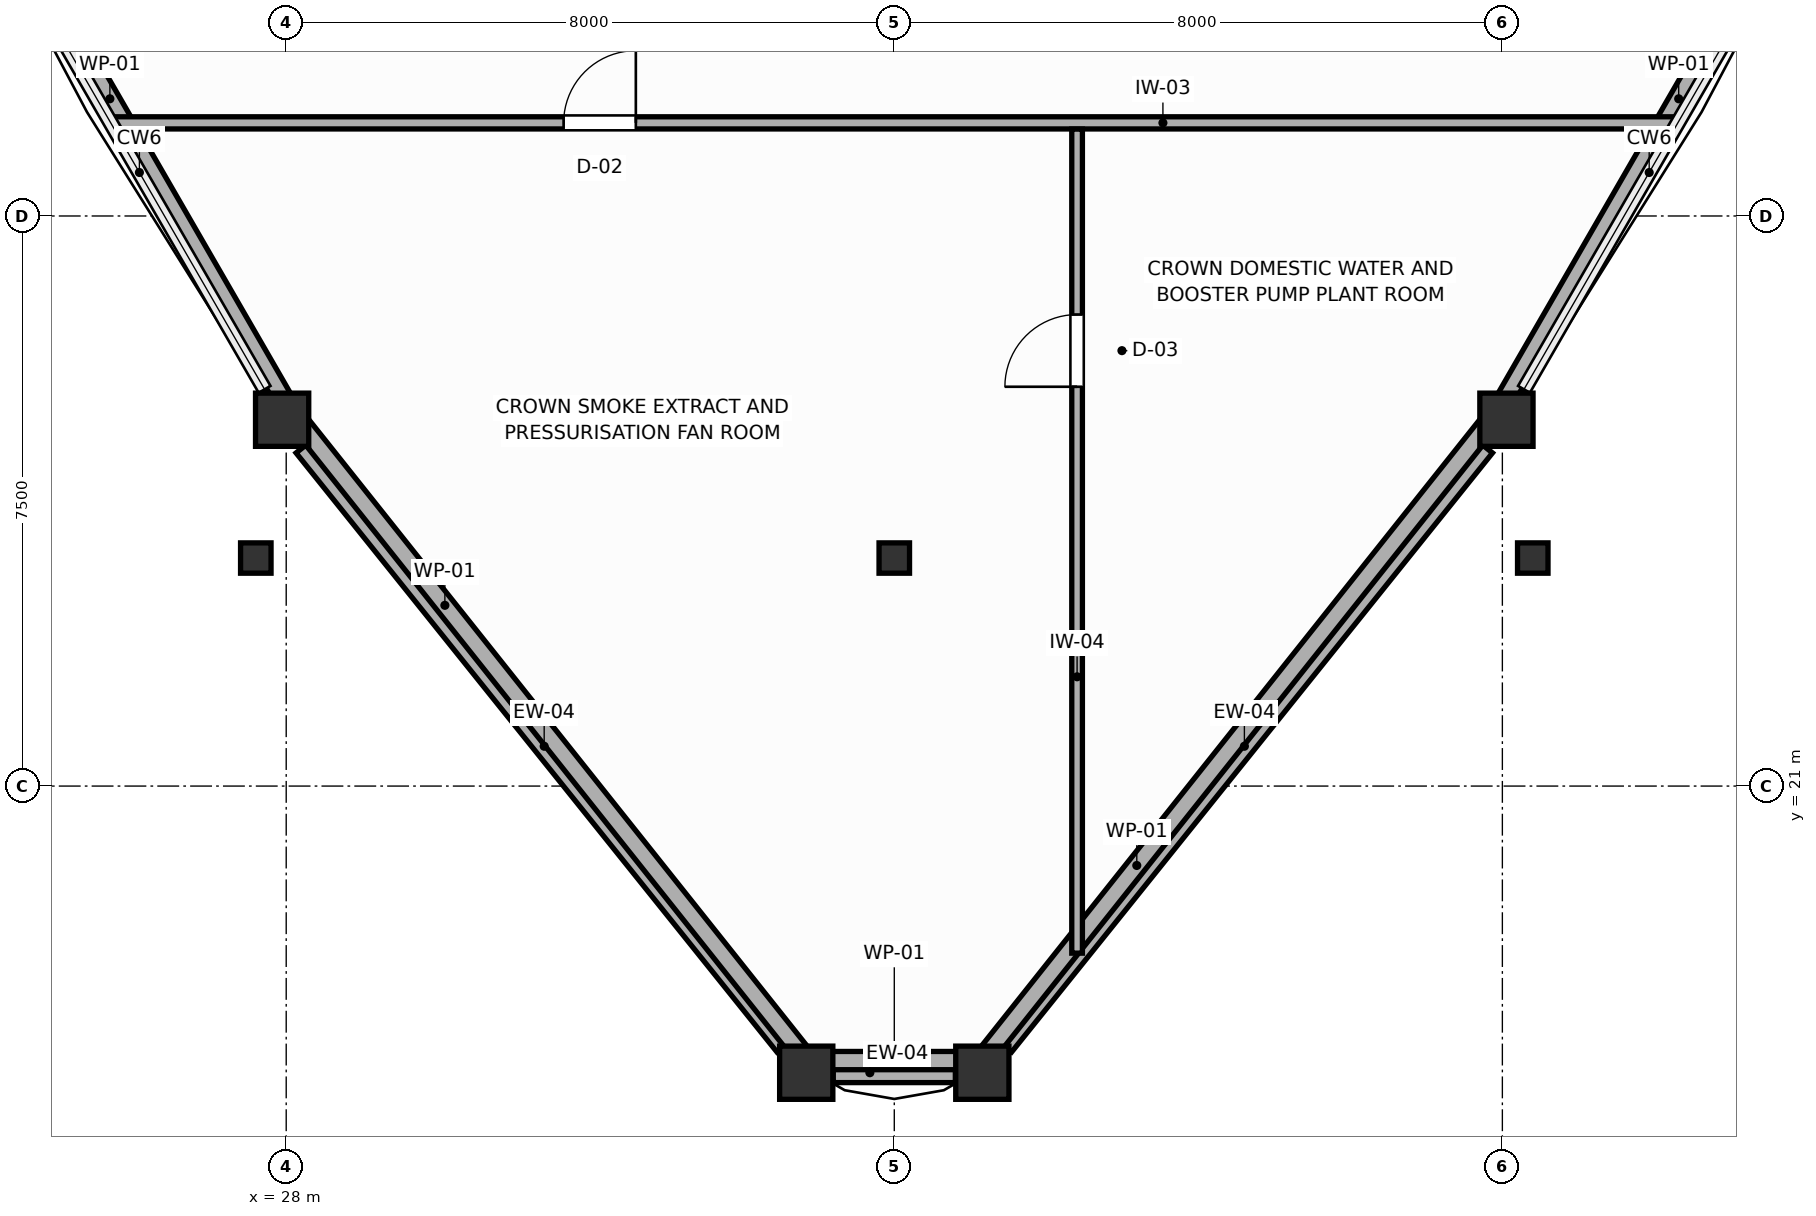
"""IFC4 building model, lengths in metres.
Left out: names, types, materials, properties, quantities, classifications, styles, units other than length and angle.
Written with IfcOpenShell. Run it as: python <this file> out.ifc"""

import sys

from ifc_helpers import new_model, si_unit, direction, frame, frame_2d, origin, origin_2d, place, context, subcontext, project, spatial, rectangle, i_section, extrude, source, transform, mapped, element, fill, save


model = new_model("IFC4")
c1 = context("Model", 3, precision=1e-05, world=origin(), true_north=direction((0.0, 1.0)))
c2 = subcontext(c1, "Body", "Model", "MODEL_VIEW")
j1 = project(units=[si_unit("LENGTHUNIT", "METRE"), si_unit("PLANEANGLEUNIT", "RADIAN")], contexts=[c1])
p1 = place(None, origin())
s1 = spatial("IfcSite", under=j1, at=p1, CompositionType="ELEMENT")
p2 = place(p1, origin())
s2 = spatial("IfcBuilding", under=s1, at=p2, CompositionType="ELEMENT")
p3 = place(p2, frame((0.0, 0.0, 296.1)))
s3 = spatial("IfcBuildingStorey", under=s2, at=p3, CompositionType="ELEMENT", Elevation=296.1)
m1 = source(origin(), c2, "Body", "SweptSolid", [
    extrude(i_section(OverallWidth=0.401, OverallDepth=0.399, WebThickness=0.022, FlangeThickness=0.036, FilletRadius=0.015, at=origin_2d()), origin(), (0.0, 0.0, 1.0), 3.6),
])
for number, where, z_axis, x_axis in (
    (1, (27.6, 24.0, 0.0), (0.0, 0.0, 1.0), (1.0, 0.0, 0.0)),
    (2, (44.4, 24.0, 0.0), (0.0, 0.0, 1.0), (1.0, 0.0, 0.0)),
    (3, (36.0, 24.0, 0.0), (0.0, 0.0, 1.0), (1.0, 0.0, 0.0)),
):
    element("IfcColumn", number, at=place(p3, frame(where, z_axis=z_axis, x_axis=x_axis)), inside=s3, PredefinedType="COLUMN", context=c2, shape_type="MappedRepresentation", body=[
        mapped(m1, transform((0.0, 0.0, 0.0), scale=1.0)),
    ])
m2 = source(origin(), c2, "Body", "SweptSolid", [
    extrude(rectangle(XDim=0.7, YDim=0.7, at=origin_2d()), origin(), (0.0, 0.0, 1.0), 3.6),
])
for number, where, z_axis, x_axis in (
    (4, (27.946, 25.819, 0.0), (0.0, 0.0, 1.0), (1.0, 0.0, 0.0)),
    (5, (34.842, 17.229, 0.0), (0.0, 0.0, 1.0), (1.0, 0.0, 0.0)),
    (6, (37.158, 17.229, 0.0), (0.0, 0.0, 1.0), (1.0, 0.0, 0.0)),
    (7, (44.054, 25.819, 0.0), (0.0, 0.0, 1.0), (1.0, 0.0, 0.0)),
):
    element("IfcColumn", number, at=place(p3, frame(where, z_axis=z_axis, x_axis=x_axis)), inside=s3, PredefinedType="COLUMN", context=c2, shape_type="MappedRepresentation", body=[
        mapped(m2, transform((0.0, 0.0, 0.0), scale=1.0)),
    ])
p4 = place(p3, frame((28.231, 25.464, 0.0), z_axis=(0.0, 0.0, 1.0), x_axis=(0.62595820312, -0.779856607299, 0.0)))
e8 = element("IfcWall", 8, at=p4, inside=s3, PredefinedType="SOLIDWALL", context=c2, shape_type="SweptSolid", body=[
    extrude(rectangle(XDim=10.105, YDim=0.26, at=frame_2d((5.053, 0.0))), origin(), (0.0, 0.0, 1.0), 3.01),
])
p5 = place(p3, frame((35.197, 17.229, 0.0), z_axis=(0.0, 0.0, 1.0), x_axis=(1.0, 0.0, 0.0)))
e9 = element("IfcWall", 9, at=p5, inside=s3, PredefinedType="SOLIDWALL", context=c2, shape_type="SweptSolid", body=[
    extrude(rectangle(XDim=1.607, YDim=0.26, at=frame_2d((0.803, 0.0))), origin(), (0.0, 0.0, 1.0), 3.01),
])
p6 = place(p3, frame((37.443, 17.584, 0.0), z_axis=(0.0, 0.0, 1.0), x_axis=(0.62595820312, 0.779856607299, 0.0)))
e10 = element("IfcWall", 10, at=p6, inside=s3, PredefinedType="SOLIDWALL", context=c2, shape_type="SweptSolid", body=[
    extrude(rectangle(XDim=10.105, YDim=0.26, at=frame_2d((5.053, 0.0))), origin(), (0.0, 0.0, 1.0), 3.01),
])
p7 = place(p3, frame((23.315, 34.139, 3.6), z_axis=(0.0, 0.0, 1.0), x_axis=(0.500007603729, -0.866021013725, 0.0)))
e11 = element("IfcWall", 11, at=p7, inside=s3, PredefinedType="PARAPET", context=c2, shape_type="SweptSolid", body=[
    extrude(rectangle(XDim=9.462, YDim=0.24, at=frame_2d((4.731, 0.0))), origin(), (0.0, 0.0, 1.0), 0.24),
])
p8 = place(p3, frame((28.046, 25.945, 3.6), z_axis=(0.0, 0.0, 1.0), x_axis=(0.622505848244, -0.782615147376, 0.0)))
e12 = element("IfcWall", 12, at=p8, inside=s3, PredefinedType="PARAPET", context=c2, shape_type="SweptSolid", body=[
    extrude(rectangle(XDim=10.933, YDim=0.24, at=frame_2d((5.467, 0.0))), origin(), (0.0, 0.0, 1.0), 0.24),
])
p9 = place(p3, frame((34.852, 17.388, 3.6), z_axis=(0.0, 0.0, 1.0), x_axis=(1.0, 0.0, 0.0)))
e13 = element("IfcWall", 13, at=p9, inside=s3, PredefinedType="PARAPET", context=c2, shape_type="SweptSolid", body=[
    extrude(rectangle(XDim=2.297, YDim=0.24, at=frame_2d((1.148, 0.0))), origin(), (0.0, 0.0, 1.0), 0.24),
])
p10 = place(p3, frame((37.148, 17.388, 3.6), z_axis=(0.0, 0.0, 1.0), x_axis=(0.622505848244, 0.782615147376, 0.0)))
e14 = element("IfcWall", 14, at=p10, inside=s3, PredefinedType="PARAPET", context=c2, shape_type="SweptSolid", body=[
    extrude(rectangle(XDim=10.933, YDim=0.24, at=frame_2d((5.467, 0.0))), origin(), (0.0, 0.0, 1.0), 0.24),
])
p11 = place(p3, frame((43.954, 25.945, 3.6), z_axis=(0.0, 0.0, 1.0), x_axis=(0.500007603729, 0.866021013725, 0.0)))
e15 = element("IfcWall", 15, at=p11, inside=s3, PredefinedType="PARAPET", context=c2, shape_type="SweptSolid", body=[
    extrude(rectangle(XDim=9.462, YDim=0.24, at=frame_2d((4.731, 0.0))), origin(), (0.0, 0.0, 1.0), 0.24),
])
p12 = place(p3, frame((25.711, 29.725, 0.0), z_axis=(0.0, 0.0, 1.0), x_axis=(1.0, 0.0, 0.0)))
e16 = element("IfcWall", 16, at=p12, inside=s3, PredefinedType="PARTITIONING", context=c2, shape_type="SweptSolid", body=[
    extrude(rectangle(XDim=20.577, YDim=0.16, at=frame_2d((10.289, 0.0))), origin(), (0.0, 0.0, 1.0), 3.34),
])
p13 = place(p12, frame((5.938, 0.0, 0.0)))
e17 = element("IfcOpeningElement", 17, at=p13, cuts=e16, PredefinedType="OPENING", context=c2, shape_type="SweptSolid", body=[
    extrude(rectangle(XDim=0.95, YDim=2.05, at=frame_2d((0.475, 1.025))), frame((0.0, 0.09, 0.0), z_axis=(0.0, -1.0, 0.0), x_axis=(1.0, 0.0, 0.0)), (0.0, 0.0, 1.0), 0.18),
])
p14 = place(p3, frame((38.405, 18.802, 0.0), z_axis=(0.0, 0.0, 1.0), x_axis=(0.0, 1.0, 0.0)))
e18 = element("IfcWall", 18, at=p14, inside=s3, PredefinedType="PARTITIONING", context=c2, shape_type="SweptSolid", body=[
    extrude(rectangle(XDim=10.841, YDim=0.14, at=frame_2d((5.42, 0.0))), origin(), (0.0, 0.0, 1.0), 3.34),
])
p15 = place(p14, frame((7.451, 0.0, 0.0)))
e19 = element("IfcOpeningElement", 19, at=p15, cuts=e18, PredefinedType="OPENING", context=c2, shape_type="SweptSolid", body=[
    extrude(rectangle(XDim=0.95, YDim=2.05, at=frame_2d((0.475, 1.025))), frame((0.0, 0.08, 0.0), z_axis=(0.0, -1.0, 0.0), x_axis=(1.0, 0.0, 0.0)), (0.0, 0.0, 1.0), 0.16),
])
p16 = place(p13, origin())
e20 = element("IfcDoor", 20, at=p16, inside=s3, OperationType="SINGLE_SWING_RIGHT", PredefinedType="DOOR", context=c2, shape_type="SweptSolid", body=[
    extrude(rectangle(XDim=0.95, YDim=2.05, at=frame_2d((0.475, 1.025))), frame((0.0, 0.025, 0.0), z_axis=(0.0, -1.0, 0.0), x_axis=(1.0, 0.0, 0.0)), (0.0, 0.0, 1.0), 0.05),
])
fill(e17, e20)
p17 = place(p15, origin())
e21 = element("IfcDoor", 21, at=p17, inside=s3, OperationType="SINGLE_SWING_LEFT", PredefinedType="DOOR", context=c2, shape_type="SweptSolid", body=[
    extrude(rectangle(XDim=0.95, YDim=2.05, at=frame_2d((0.475, 1.025))), frame((0.0, 0.025, 0.0), z_axis=(0.0, -1.0, 0.0), x_axis=(1.0, 0.0, 0.0)), (0.0, 0.0, 1.0), 0.05),
])
fill(e19, e21)
save(model, sys.argv[1])
